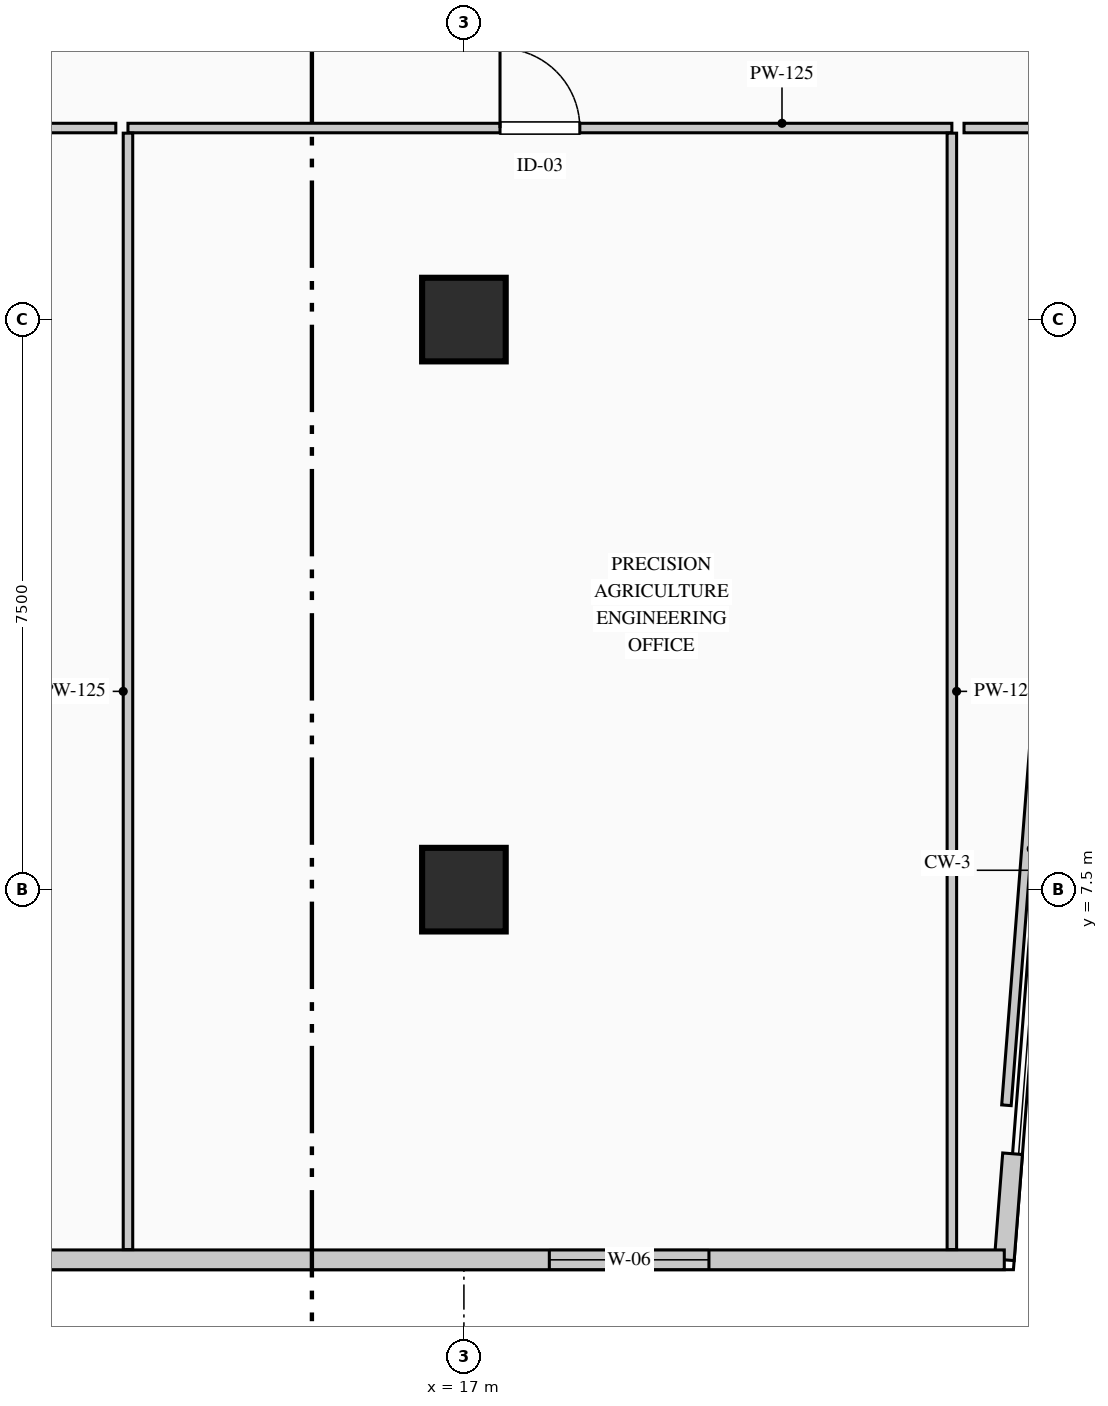
"""IFC4 building model, lengths in metres.
Left out: names, types, materials, properties, quantities, classifications, styles, units other than length and angle.
Written with IfcOpenShell. Run it as: python <this file> out.ifc"""

import sys

from ifc_helpers import new_model, si_unit, direction, frame, frame_2d, origin, origin_2d, place, context, subcontext, project, spatial, rectangle, extrude, element, fill, save


model = new_model("IFC4")
c1 = context("Model", 3, precision=1e-05, world=origin(), true_north=direction((0.0, 1.0)))
c2 = subcontext(c1, "Body", "Model", "MODEL_VIEW")
j1 = project(units=[si_unit("LENGTHUNIT", "METRE"), si_unit("PLANEANGLEUNIT", "RADIAN")], contexts=[c1])
p1 = place(None, origin())
s1 = spatial("IfcSite", under=j1, at=p1, CompositionType="ELEMENT")
p2 = place(p1, origin())
s2 = spatial("IfcBuilding", under=s1, at=p2, CompositionType="ELEMENT")
p3 = place(p2, frame((0.0, 0.0, 127.2)))
s3 = spatial("IfcBuildingStorey", under=s2, at=p3, CompositionType="ELEMENT", Elevation=127.2)
for number, where, z_axis, x_axis in (
    (1, (17.0, 7.5, 0.0), (0.0, 0.0, 1.0), (1.0, 0.0, 0.0)),
    (2, (17.0, 15.0, 0.0), (0.0, 0.0, 1.0), (1.0, 0.0, 0.0)),
):
    element("IfcColumn", number, at=place(p3, frame(where, z_axis=z_axis, x_axis=x_axis)), inside=s3, PredefinedType="COLUMN", context=c2, shape_type="SweptSolid", body=[
        extrude(rectangle(XDim=1.1, YDim=1.1, at=origin_2d()), origin(), (0.0, 0.0, 1.0), 3.95),
    ])
p4 = place(p3, frame((24.219, 4.026, 0.0), z_axis=(0.0, 0.0, 1.0), x_axis=(-0.077776627829, -0.996970810086, 0.0)))
e3 = element("IfcWall", 3, at=p4, inside=s3, PredefinedType="STANDARD", context=c2, shape_type="SweptSolid", body=[
    extrude(rectangle(XDim=1.4, YDim=0.26, at=frame_2d((0.7, 0.0))), origin(), (0.0, 0.0, 1.0), 3.69),
])
p5 = place(p3, frame((24.11, 2.63, 0.0), z_axis=(0.0, 0.0, 1.0), x_axis=(-1.0, 0.0, 0.0)))
e4 = element("IfcWall", 4, at=p5, inside=s3, PredefinedType="STANDARD", context=c2, shape_type="SweptSolid", body=[
    extrude(rectangle(XDim=13.71, YDim=0.26, at=frame_2d((6.855, 0.0))), origin(), (0.0, 0.0, 1.0), 3.69),
])
p6 = place(p5, frame((3.886, 0.0, 0.9)))
e5 = element("IfcOpeningElement", 5, at=p6, cuts=e4, PredefinedType="OPENING", context=c2, shape_type="SweptSolid", body=[
    extrude(rectangle(XDim=2.1, YDim=2.0, at=frame_2d((1.05, 1.0))), frame((0.0, 0.14, 0.0), z_axis=(0.0, -1.0, 0.0), x_axis=(1.0, 0.0, 0.0)), (0.0, 0.0, 1.0), 0.28),
])
p7 = place(p3, frame((12.58, 17.52, 0.0), z_axis=(0.0, 0.0, 1.0), x_axis=(1.0, 0.0, 0.0)))
e6 = element("IfcWall", 6, at=p7, inside=s3, PredefinedType="PARTITIONING", context=c2, shape_type="SweptSolid", body=[
    extrude(rectangle(XDim=10.84, YDim=0.125, at=frame_2d((5.42, 0.0))), origin(), (0.0, 0.0, 1.0), 3.69),
])
p8 = place(p7, frame((4.895, 0.0, 0.0)))
e7 = element("IfcOpeningElement", 7, at=p8, cuts=e6, PredefinedType="OPENING", context=c2, shape_type="SweptSolid", body=[
    extrude(rectangle(XDim=1.05, YDim=2.15, at=frame_2d((0.525, 1.075))), frame((0.0, 0.073, 0.0), z_axis=(0.0, -1.0, 0.0), x_axis=(1.0, 0.0, 0.0)), (0.0, 0.0, 1.0), 0.145),
])
for number, where, z_axis, x_axis in (
    (8, (23.42, 17.452, 0.0), (0.0, 0.0, 1.0), (0.0, -1.0, 0.0)),
    (9, (12.58, 2.765, 0.0), (0.0, 0.0, 1.0), (0.0, 1.0, 0.0)),
):
    element("IfcWall", number, at=place(p3, frame(where, z_axis=z_axis, x_axis=x_axis)), inside=s3, PredefinedType="PARTITIONING", context=c2, shape_type="SweptSolid", body=[
        extrude(rectangle(XDim=14.688, YDim=0.125, at=frame_2d((7.344, 0.0))), origin(), (0.0, 0.0, 1.0), 3.69),
    ])
p9 = place(p3, frame((6.36, 17.52, 0.0), z_axis=(0.0, 0.0, 1.0), x_axis=(1.0, 0.0, 0.0)))
e10 = element("IfcWall", 10, at=p9, inside=s3, PredefinedType="PARTITIONING", context=c2, shape_type="SweptSolid", body=[
    extrude(rectangle(XDim=6.06, YDim=0.125, at=frame_2d((3.03, 0.0))), origin(), (0.0, 0.0, 1.0), 3.69),
])
p10 = place(p9, frame((2.505, 0.0, 0.0)))
e11 = element("IfcOpeningElement", 11, at=p10, cuts=e10, PredefinedType="OPENING", context=c2, shape_type="SweptSolid", body=[
    extrude(rectangle(XDim=1.05, YDim=2.15, at=frame_2d((0.525, 1.075))), frame((0.0, 0.073, 0.0), z_axis=(0.0, -1.0, 0.0), x_axis=(1.0, 0.0, 0.0)), (0.0, 0.0, 1.0), 0.145),
])
p11 = place(p3, frame((24.666, 11.42, 0.0), z_axis=(0.0, 0.0, 1.0), x_axis=(-0.077847945506, -0.996965243818, 0.0)))
e12 = element("IfcWall", 12, at=p11, inside=s3, PredefinedType="PARTITIONING", context=c2, shape_type="SweptSolid", body=[
    extrude(rectangle(XDim=6.777, YDim=0.125, at=frame_2d((3.389, 0.0))), origin(), (0.0, 0.0, 1.0), 3.69),
])
p12 = place(p3, frame((23.58, 17.52, 0.0), z_axis=(0.0, 0.0, 1.0), x_axis=(1.0, 0.0, 0.0)))
e13 = element("IfcWall", 13, at=p12, inside=s3, PredefinedType="PARTITIONING", context=c2, shape_type="SweptSolid", body=[
    extrude(rectangle(XDim=9.84, YDim=0.125, at=frame_2d((4.92, 0.0))), origin(), (0.0, 0.0, 1.0), 3.375),
])
p13 = place(p12, frame((4.395, 0.0, 0.0)))
e14 = element("IfcOpeningElement", 14, at=p13, cuts=e13, PredefinedType="OPENING", context=c2, shape_type="SweptSolid", body=[
    extrude(rectangle(XDim=1.05, YDim=2.15, at=frame_2d((0.525, 1.075))), frame((0.0, 0.073, 0.0), z_axis=(0.0, -1.0, 0.0), x_axis=(1.0, 0.0, 0.0)), (0.0, 0.0, 1.0), 0.145),
])
p14 = place(p6, origin())
e15 = element("IfcWindow", 15, at=p14, inside=s3, PartitioningType="DOUBLE_PANEL_VERTICAL", PredefinedType="WINDOW", context=c2, shape_type="SweptSolid", body=[
    extrude(rectangle(XDim=2.1, YDim=2.0, at=frame_2d((1.05, 1.0))), frame((0.0, 0.03, 0.0), z_axis=(0.0, -1.0, 0.0), x_axis=(1.0, 0.0, 0.0)), (0.0, 0.0, 1.0), 0.06),
])
fill(e5, e15)
p15 = place(p8, origin())
e16 = element("IfcDoor", 16, at=p15, inside=s3, OperationType="SINGLE_SWING_LEFT", PredefinedType="DOOR", context=c2, shape_type="SweptSolid", body=[
    extrude(rectangle(XDim=1.05, YDim=2.15, at=frame_2d((0.525, 1.075))), frame((0.0, 0.025, 0.0), z_axis=(0.0, -1.0, 0.0), x_axis=(1.0, 0.0, 0.0)), (0.0, 0.0, 1.0), 0.05),
])
fill(e7, e16)
save(model, sys.argv[1])
